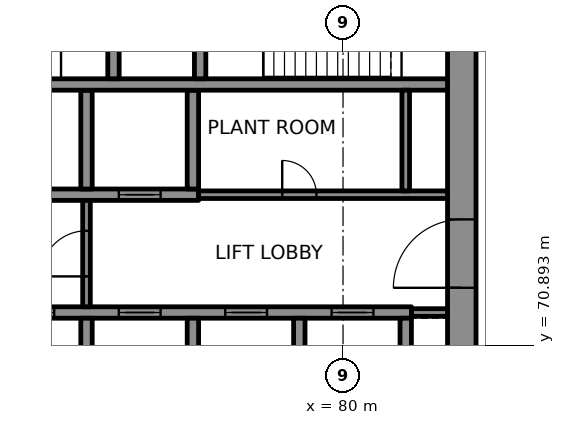
"""IFC4 building model, lengths in metres.
Left out: names, types, materials, properties, quantities, classifications, styles, units other than length and angle.
Written with IfcOpenShell. Run it as: python <this file> out.ifc"""

import sys

from ifc_helpers import new_model, si_unit, direction, frame, frame_2d, origin, place, context, subcontext, project, spatial, rectangle, extrude, element, fill, save


model = new_model("IFC4")
c1 = context("Model", 3, precision=1e-05, world=origin(), true_north=direction((0.0, 1.0)))
c2 = subcontext(c1, "Body", "Model", "MODEL_VIEW")
j1 = project(units=[si_unit("LENGTHUNIT", "METRE"), si_unit("PLANEANGLEUNIT", "RADIAN")], contexts=[c1])
p1 = place(None, origin())
s1 = spatial("IfcSite", under=j1, at=p1, CompositionType="ELEMENT")
p2 = place(p1, origin())
s2 = spatial("IfcBuilding", under=s1, at=p2, CompositionType="ELEMENT")
p3 = place(p2, frame((0.0, 0.0, 252.1)))
s3 = spatial("IfcBuildingStorey", under=s2, at=p3, CompositionType="ELEMENT", Elevation=252.1)
p4 = place(p3, frame((83.125, 69.0, 0.0), z_axis=(0.0, 0.0, 1.0), x_axis=(0.0, 1.0, 0.0)))
e1 = element("IfcWall", 1, at=p4, inside=s3, PredefinedType="SHEAR", context=c2, shape_type="SweptSolid", body=[
    extrude(rectangle(XDim=12.0, YDim=0.75, at=frame_2d((6.0, 0.0))), origin(), (0.0, 0.0, 1.0), 4.3),
])
p5 = place(p4, frame((3.4, 0.0, 0.0)))
e2 = element("IfcOpeningElement", 2, at=p5, cuts=e1, PredefinedType="OPENING", context=c2, shape_type="SweptSolid", body=[
    extrude(rectangle(XDim=1.8, YDim=2.1, at=frame_2d((0.9, 1.05))), frame((0.0, 0.385, 0.0), z_axis=(0.0, -1.0, 0.0), x_axis=(1.0, 0.0, 0.0)), (0.0, 0.0, 1.0), 0.77),
])
p6 = place(p3, frame((70.3, 71.75, 0.0), z_axis=(0.0, 0.0, 1.0), x_axis=(1.0, 0.0, 0.0)))
e3 = element("IfcWall", 3, at=p6, inside=s3, PredefinedType="SHEAR", context=c2, shape_type="SweptSolid", body=[
    extrude(rectangle(XDim=11.5, YDim=0.3, at=frame_2d((5.75, 0.0))), origin(), (0.0, 0.0, 1.0), 4.3),
])
p7 = place(p6, frame((1.0, 0.0, 0.0)))
e4 = element("IfcOpeningElement", 4, at=p7, cuts=e3, PredefinedType="OPENING", context=c2, shape_type="SweptSolid", body=[
    extrude(rectangle(XDim=1.1, YDim=2.1, at=frame_2d((0.55, 1.05))), frame((0.0, 0.16, 0.0), z_axis=(0.0, -1.0, 0.0), x_axis=(1.0, 0.0, 0.0)), (0.0, 0.0, 1.0), 0.32),
])
p8 = place(p6, frame((3.8, 0.0, 0.0)))
e5 = element("IfcOpeningElement", 5, at=p8, cuts=e3, PredefinedType="OPENING", context=c2, shape_type="SweptSolid", body=[
    extrude(rectangle(XDim=1.1, YDim=2.1, at=frame_2d((0.55, 1.05))), frame((0.0, 0.16, 0.0), z_axis=(0.0, -1.0, 0.0), x_axis=(1.0, 0.0, 0.0)), (0.0, 0.0, 1.0), 0.32),
])
p9 = place(p6, frame((6.6, 0.0, 0.0)))
e6 = element("IfcOpeningElement", 6, at=p9, cuts=e3, PredefinedType="OPENING", context=c2, shape_type="SweptSolid", body=[
    extrude(rectangle(XDim=1.1, YDim=2.1, at=frame_2d((0.55, 1.05))), frame((0.0, 0.16, 0.0), z_axis=(0.0, -1.0, 0.0), x_axis=(1.0, 0.0, 0.0)), (0.0, 0.0, 1.0), 0.32),
])
p10 = place(p6, frame((9.4, 0.0, 0.0)))
e7 = element("IfcOpeningElement", 7, at=p10, cuts=e3, PredefinedType="OPENING", context=c2, shape_type="SweptSolid", body=[
    extrude(rectangle(XDim=1.1, YDim=2.1, at=frame_2d((0.55, 1.05))), frame((0.0, 0.16, 0.0), z_axis=(0.0, -1.0, 0.0), x_axis=(1.0, 0.0, 0.0)), (0.0, 0.0, 1.0), 0.32),
])
p11 = place(p3, frame((70.3, 74.85, 0.0), z_axis=(0.0, 0.0, 1.0), x_axis=(1.0, 0.0, 0.0)))
e8 = element("IfcWall", 8, at=p11, inside=s3, PredefinedType="SHEAR", context=c2, shape_type="SweptSolid", body=[
    extrude(rectangle(XDim=5.9, YDim=0.3, at=frame_2d((2.95, 0.0))), origin(), (0.0, 0.0, 1.0), 4.3),
])
p12 = place(p11, frame((3.8, 0.0, 0.0)))
e9 = element("IfcOpeningElement", 9, at=p12, cuts=e8, PredefinedType="OPENING", context=c2, shape_type="SweptSolid", body=[
    extrude(rectangle(XDim=1.1, YDim=2.1, at=frame_2d((0.55, 1.05))), frame((0.0, 0.16, 0.0), z_axis=(0.0, -1.0, 0.0), x_axis=(1.0, 0.0, 0.0)), (0.0, 0.0, 1.0), 0.32),
])
for number, where, z_axis, x_axis in (
    (10, (73.25, 69.0, 0.0), (0.0, 0.0, 1.0), (0.0, 1.0, 0.0)),
    (11, (73.25, 75.0, 0.0), (0.0, 0.0, 1.0), (0.0, 1.0, 0.0)),
    (12, (76.05, 69.0, 0.0), (0.0, 0.0, 1.0), (0.0, 1.0, 0.0)),
    (13, (76.05, 75.0, 0.0), (0.0, 0.0, 1.0), (0.0, 1.0, 0.0)),
    (14, (78.85, 69.0, 0.0), (0.0, 0.0, 1.0), (0.0, 1.0, 0.0)),
    (15, (81.65, 69.0, 0.0), (0.0, 0.0, 1.0), (0.0, 1.0, 0.0)),
):
    element("IfcWall", number, at=place(p3, frame(where, z_axis=z_axis, x_axis=x_axis)), inside=s3, PredefinedType="SHEAR", context=c2, shape_type="SweptSolid", body=[
        extrude(rectangle(XDim=2.6, YDim=0.3, at=frame_2d((1.3, 0.0))), origin(), (0.0, 0.0, 1.0), 4.3),
    ])
p13 = place(p3, frame((67.25, 77.75, 0.0), z_axis=(0.0, 0.0, 1.0), x_axis=(1.0, 0.0, 0.0)))
e16 = element("IfcWall", 16, at=p13, inside=s3, PredefinedType="SHEAR", context=c2, shape_type="SweptSolid", body=[
    extrude(rectangle(XDim=15.5, YDim=0.3, at=frame_2d((7.75, 0.0))), origin(), (0.0, 0.0, 1.0), 4.3),
])
p14 = place(p13, frame((0.445, 0.0, 0.0)))
e17 = element("IfcOpeningElement", 17, at=p14, cuts=e16, PredefinedType="OPENING", context=c2, shape_type="SweptSolid", body=[
    extrude(rectangle(XDim=1.0, YDim=2.1, at=frame_2d((0.5, 1.05))), frame((0.0, 0.16, 0.0), z_axis=(0.0, -1.0, 0.0), x_axis=(1.0, 0.0, 0.0)), (0.0, 0.0, 1.0), 0.32),
])
for number, where, z_axis, x_axis in (
    (18, (73.96, 77.9, 0.0), (0.0, 0.0, 1.0), (0.0, 1.0, 0.0)),
    (19, (76.24, 77.9, 0.0), (0.0, 0.0, 1.0), (0.0, 1.0, 0.0)),
):
    element("IfcWall", number, at=place(p3, frame(where, z_axis=z_axis, x_axis=x_axis)), inside=s3, PredefinedType="SHEAR", context=c2, shape_type="SweptSolid", body=[
        extrude(rectangle(XDim=3.1, YDim=0.3, at=frame_2d((1.55, 0.0))), origin(), (0.0, 0.0, 1.0), 4.3),
    ])
p15 = place(p3, frame((81.8, 71.75, 0.0), z_axis=(0.0, 0.0, 1.0), x_axis=(1.0, 0.0, 0.0)))
e20 = element("IfcWall", 20, at=p15, inside=s3, PredefinedType="PARTITIONING", context=c2, shape_type="SweptSolid", body=[
    extrude(rectangle(XDim=0.95, YDim=0.2, at=frame_2d((0.475, 0.0))), origin(), (0.0, 0.0, 1.0), 4.3),
])
p16 = place(p3, frame((76.2, 74.85, 0.0), z_axis=(0.0, 0.0, 1.0), x_axis=(1.0, 0.0, 0.0)))
e21 = element("IfcWall", 21, at=p16, inside=s3, PredefinedType="PARTITIONING", context=c2, shape_type="SweptSolid", body=[
    extrude(rectangle(XDim=6.55, YDim=0.2, at=frame_2d((3.275, 0.0))), origin(), (0.0, 0.0, 1.0), 4.3),
])
p17 = place(p16, frame((2.2, 0.0, 0.0)))
e22 = element("IfcOpeningElement", 22, at=p17, cuts=e21, PredefinedType="OPENING", context=c2, shape_type="SweptSolid", body=[
    extrude(rectangle(XDim=0.9, YDim=2.1, at=frame_2d((0.45, 1.05))), frame((0.0, 0.11, 0.0), z_axis=(0.0, -1.0, 0.0), x_axis=(1.0, 0.0, 0.0)), (0.0, 0.0, 1.0), 0.22),
])
p18 = place(p3, frame((73.25, 71.9, 0.0), z_axis=(0.0, 0.0, 1.0), x_axis=(0.0, 1.0, 0.0)))
e23 = element("IfcWall", 23, at=p18, inside=s3, PredefinedType="PARTITIONING", context=c2, shape_type="SweptSolid", body=[
    extrude(rectangle(XDim=2.8, YDim=0.2, at=frame_2d((1.4, 0.0))), origin(), (0.0, 0.0, 1.0), 4.3),
])
p19 = place(p18, frame((0.8, 0.0, 0.0)))
e24 = element("IfcOpeningElement", 24, at=p19, cuts=e23, PredefinedType="OPENING", context=c2, shape_type="SweptSolid", body=[
    extrude(rectangle(XDim=1.2, YDim=2.1, at=frame_2d((0.6, 1.05))), frame((0.0, 0.11, 0.0), z_axis=(0.0, -1.0, 0.0), x_axis=(1.0, 0.0, 0.0)), (0.0, 0.0, 1.0), 0.22),
])
p20 = place(p3, frame((81.65, 74.95, 0.0), z_axis=(0.0, 0.0, 1.0), x_axis=(0.0, 1.0, 0.0)))
e25 = element("IfcWall", 25, at=p20, inside=s3, PredefinedType="PARTITIONING", context=c2, shape_type="SweptSolid", body=[
    extrude(rectangle(XDim=2.65, YDim=0.2, at=frame_2d((1.325, 0.0))), origin(), (0.0, 0.0, 1.0), 4.3),
])
p21 = place(p7, origin())
e26 = element("IfcDoor", 26, at=p21, inside=s3, OperationType="DOUBLE_DOOR_SLIDING", PredefinedType="DOOR", context=c2, shape_type="SweptSolid", body=[
    extrude(rectangle(XDim=1.1, YDim=2.1, at=frame_2d((0.55, 1.05))), frame((0.0, 0.025, 0.0), z_axis=(0.0, -1.0, 0.0), x_axis=(1.0, 0.0, 0.0)), (0.0, 0.0, 1.0), 0.05),
])
fill(e4, e26)
p22 = place(p8, origin())
e27 = element("IfcDoor", 27, at=p22, inside=s3, OperationType="DOUBLE_DOOR_SLIDING", PredefinedType="DOOR", context=c2, shape_type="SweptSolid", body=[
    extrude(rectangle(XDim=1.1, YDim=2.1, at=frame_2d((0.55, 1.05))), frame((0.0, 0.025, 0.0), z_axis=(0.0, -1.0, 0.0), x_axis=(1.0, 0.0, 0.0)), (0.0, 0.0, 1.0), 0.05),
])
fill(e5, e27)
p23 = place(p9, origin())
e28 = element("IfcDoor", 28, at=p23, inside=s3, OperationType="DOUBLE_DOOR_SLIDING", PredefinedType="DOOR", context=c2, shape_type="SweptSolid", body=[
    extrude(rectangle(XDim=1.1, YDim=2.1, at=frame_2d((0.55, 1.05))), frame((0.0, 0.025, 0.0), z_axis=(0.0, -1.0, 0.0), x_axis=(1.0, 0.0, 0.0)), (0.0, 0.0, 1.0), 0.05),
])
fill(e6, e28)
p24 = place(p10, origin())
e29 = element("IfcDoor", 29, at=p24, inside=s3, OperationType="DOUBLE_DOOR_SLIDING", PredefinedType="DOOR", context=c2, shape_type="SweptSolid", body=[
    extrude(rectangle(XDim=1.1, YDim=2.1, at=frame_2d((0.55, 1.05))), frame((0.0, 0.025, 0.0), z_axis=(0.0, -1.0, 0.0), x_axis=(1.0, 0.0, 0.0)), (0.0, 0.0, 1.0), 0.05),
])
fill(e7, e29)
p25 = place(p12, origin())
e30 = element("IfcDoor", 30, at=p25, inside=s3, OperationType="DOUBLE_DOOR_SLIDING", PredefinedType="DOOR", context=c2, shape_type="SweptSolid", body=[
    extrude(rectangle(XDim=1.1, YDim=2.1, at=frame_2d((0.55, 1.05))), frame((0.0, 0.025, 0.0), z_axis=(0.0, -1.0, 0.0), x_axis=(1.0, 0.0, 0.0)), (0.0, 0.0, 1.0), 0.05),
])
fill(e9, e30)
p26 = place(p19, origin())
e31 = element("IfcDoor", 31, at=p26, inside=s3, OperationType="SINGLE_SWING_LEFT", PredefinedType="DOOR", context=c2, shape_type="SweptSolid", body=[
    extrude(rectangle(XDim=1.2, YDim=2.1, at=frame_2d((0.6, 1.05))), frame((0.0, 0.025, 0.0), z_axis=(0.0, -1.0, 0.0), x_axis=(1.0, 0.0, 0.0)), (0.0, 0.0, 1.0), 0.05),
])
fill(e24, e31)
p27 = place(p5, origin())
e32 = element("IfcDoor", 32, at=p27, inside=s3, OperationType="SINGLE_SWING_LEFT", PredefinedType="DOOR", context=c2, shape_type="SweptSolid", body=[
    extrude(rectangle(XDim=1.8, YDim=2.1, at=frame_2d((0.9, 1.05))), frame((0.0, 0.095, 0.0), z_axis=(0.0, -1.0, 0.0), x_axis=(1.0, 0.0, 0.0)), (0.0, 0.0, 1.0), 0.19),
])
fill(e2, e32)
p28 = place(p17, origin())
e33 = element("IfcDoor", 33, at=p28, inside=s3, OperationType="SINGLE_SWING_LEFT", PredefinedType="DOOR", context=c2, shape_type="SweptSolid", body=[
    extrude(rectangle(XDim=0.9, YDim=2.1, at=frame_2d((0.45, 1.05))), frame((0.0, 0.025, 0.0), z_axis=(0.0, -1.0, 0.0), x_axis=(1.0, 0.0, 0.0)), (0.0, 0.0, 1.0), 0.05),
])
fill(e22, e33)
save(model, sys.argv[1])
